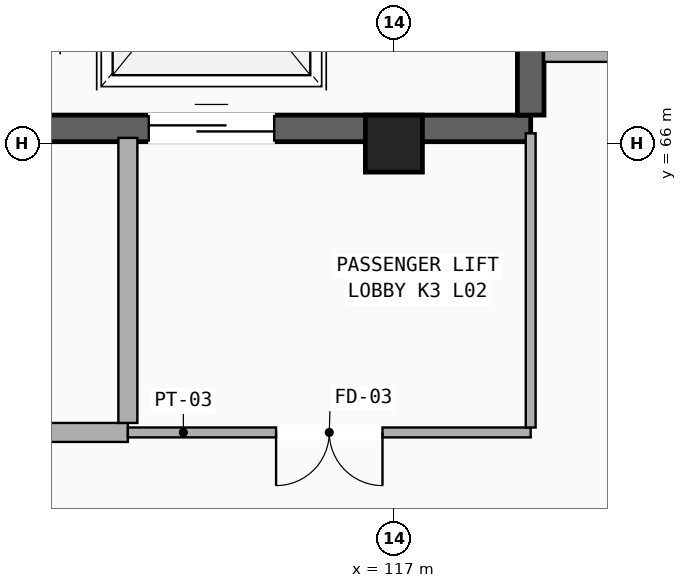
"""IFC4 building model, lengths in metres.
Left out: names, types, materials, properties, quantities, classifications, styles, units other than length and angle.
Written with IfcOpenShell. Run it as: python <this file> out.ifc"""

import sys

from ifc_helpers import new_model, si_unit, direction, frame, frame_2d, origin, origin_2d, place, context, subcontext, project, spatial, rectangle, extrude, element, fill, save


model = new_model("IFC4")
c1 = context("Model", 3, precision=1e-05, world=origin(), true_north=direction((0.0, 1.0)))
c2 = subcontext(c1, "Body", "Model", "MODEL_VIEW")
j1 = project(units=[si_unit("LENGTHUNIT", "METRE"), si_unit("PLANEANGLEUNIT", "RADIAN")], contexts=[c1])
p1 = place(None, origin())
s1 = spatial("IfcSite", under=j1, at=p1, CompositionType="ELEMENT")
p2 = place(p1, origin())
s2 = spatial("IfcBuilding", under=s1, at=p2, CompositionType="ELEMENT")
p3 = place(p2, frame((0.0, 0.0, 9.52)))
s3 = spatial("IfcBuildingStorey", under=s2, at=p3, CompositionType="ELEMENT", Elevation=9.52)
p4 = place(p3, frame((117.0, 66.0, 0.0), z_axis=(0.0, 0.0, 1.0), x_axis=(1.0, 0.0, 0.0)))
e1 = element("IfcColumn", 1, at=p4, inside=s3, PredefinedType="COLUMN", context=c2, shape_type="SweptSolid", body=[
    extrude(rectangle(XDim=0.75, YDim=0.75, at=origin_2d()), origin(), (0.0, 0.0, 1.0), 4.08),
])
p5 = place(p3, frame((108.5, 66.2, 0.0), z_axis=(0.0, 0.0, 1.0), x_axis=(1.0, 0.0, 0.0)))
e2 = element("IfcWall", 2, at=p5, inside=s3, PredefinedType="SHEAR", context=c2, shape_type="SweptSolid", body=[
    extrude(rectangle(XDim=10.3, YDim=0.35, at=frame_2d((5.15, 0.0))), origin(), (0.0, 0.0, 1.0), 4.08),
])
p6 = place(p5, frame((0.45, 0.0, 0.0)))
e3 = element("IfcOpeningElement", 3, at=p6, cuts=e2, PredefinedType="OPENING", context=c2, shape_type="SweptSolid", body=[
    extrude(rectangle(XDim=1.1, YDim=2.2, at=frame_2d((0.55, 1.1))), frame((0.0, 0.185, 0.0), z_axis=(0.0, -1.0, 0.0), x_axis=(1.0, 0.0, 0.0)), (0.0, 0.0, 1.0), 0.37),
])
p7 = place(p5, frame((2.09, 0.0, 0.0)))
e4 = element("IfcOpeningElement", 4, at=p7, cuts=e2, PredefinedType="OPENING", context=c2, shape_type="SweptSolid", body=[
    extrude(rectangle(XDim=1.22, YDim=2.2, at=frame_2d((0.61, 1.1))), frame((0.0, 0.185, 0.0), z_axis=(0.0, -1.0, 0.0), x_axis=(1.0, 0.0, 0.0)), (0.0, 0.0, 1.0), 0.37),
])
p8 = place(p5, frame((5.275, 0.0, 0.0)))
e5 = element("IfcOpeningElement", 5, at=p8, cuts=e2, PredefinedType="OPENING", context=c2, shape_type="SweptSolid", body=[
    extrude(rectangle(XDim=1.65, YDim=2.34, at=frame_2d((0.825, 1.17))), frame((0.0, 0.185, 0.0), z_axis=(0.0, -1.0, 0.0), x_axis=(1.0, 0.0, 0.0)), (0.0, 0.0, 1.0), 0.37),
])
p9 = place(p3, frame((118.8, 66.375, 0.0), z_axis=(0.0, 0.0, 1.0), x_axis=(0.0, 1.0, 0.0)))
e6 = element("IfcWall", 6, at=p9, inside=s3, PredefinedType="SHEAR", context=c2, shape_type="SweptSolid", body=[
    extrude(rectangle(XDim=8.25, YDim=0.35, at=frame_2d((4.125, 0.0))), origin(), (0.0, 0.0, 1.0), 4.08),
])
p10 = place(p3, frame((108.5, 62.2, 0.0), z_axis=(0.0, 0.0, 1.0), x_axis=(1.0, 0.0, 0.0)))
e7 = element("IfcWall", 7, at=p10, inside=s3, PredefinedType="PARTITIONING", context=c2, shape_type="SweptSolid", body=[
    extrude(rectangle(XDim=5.0, YDim=0.25, at=frame_2d((2.5, 0.0))), origin(), (0.0, 0.0, 1.0), 3.84),
])
p11 = place(p10, frame((1.95, 0.0, 0.0)))
e8 = element("IfcOpeningElement", 8, at=p11, cuts=e7, PredefinedType="OPENING", context=c2, shape_type="SweptSolid", body=[
    extrude(rectangle(XDim=1.1, YDim=2.2, at=frame_2d((0.55, 1.1))), frame((0.0, 0.135, 0.0), z_axis=(0.0, -1.0, 0.0), x_axis=(1.0, 0.0, 0.0)), (0.0, 0.0, 1.0), 0.27),
])
p12 = place(p3, frame((113.5, 62.325, 0.0), z_axis=(0.0, 0.0, 1.0), x_axis=(0.0, 1.0, 0.0)))
e9 = element("IfcWall", 9, at=p12, inside=s3, PredefinedType="PARTITIONING", context=c2, shape_type="SweptSolid", body=[
    extrude(rectangle(XDim=3.75, YDim=0.25, at=frame_2d((1.875, 0.0))), origin(), (0.0, 0.0, 1.0), 3.07),
])
p13 = place(p3, frame((113.5, 62.2, 0.0), z_axis=(0.0, 0.0, 1.0), x_axis=(1.0, 0.0, 0.0)))
e10 = element("IfcWall", 10, at=p13, inside=s3, PredefinedType="PARTITIONING", context=c2, shape_type="SweptSolid", body=[
    extrude(rectangle(XDim=5.3, YDim=0.13, at=frame_2d((2.65, 0.0))), origin(), (0.0, 0.0, 1.0), 3.84),
])
p14 = place(p13, frame((1.95, 0.0, 0.0)))
e11 = element("IfcOpeningElement", 11, at=p14, cuts=e10, PredefinedType="OPENING", context=c2, shape_type="SweptSolid", body=[
    extrude(rectangle(XDim=1.4, YDim=2.2, at=frame_2d((0.7, 1.1))), frame((0.0, 0.075, 0.0), z_axis=(0.0, -1.0, 0.0), x_axis=(1.0, 0.0, 0.0)), (0.0, 0.0, 1.0), 0.15),
])
p15 = place(p3, frame((118.8, 62.265, 0.0), z_axis=(0.0, 0.0, 1.0), x_axis=(0.0, 1.0, 0.0)))
e12 = element("IfcWall", 12, at=p15, inside=s3, PredefinedType="PARTITIONING", context=c2, shape_type="SweptSolid", body=[
    extrude(rectangle(XDim=3.87, YDim=0.13, at=frame_2d((1.935, 0.0))), origin(), (0.0, 0.0, 1.0), 3.07),
])
p16 = place(p3, frame((118.975, 67.2, 0.0), z_axis=(0.0, 0.0, 1.0), x_axis=(1.0, 0.0, 0.0)))
e13 = element("IfcWall", 13, at=p16, inside=s3, PredefinedType="PARTITIONING", context=c2, shape_type="SweptSolid", body=[
    extrude(rectangle(XDim=15.225, YDim=0.25, at=frame_2d((7.612, 0.0))), origin(), (0.0, 0.0, 1.0), 3.17),
])
p17 = place(p8, origin())
e14 = element("IfcDoor", 14, at=p17, inside=s3, OperationType="SLIDING_TO_LEFT", PredefinedType="DOOR", context=c2, shape_type="SweptSolid", body=[
    extrude(rectangle(XDim=1.65, YDim=2.34, at=frame_2d((0.825, 1.17))), frame((0.0, 0.025, 0.0), z_axis=(0.0, -1.0, 0.0), x_axis=(1.0, 0.0, 0.0)), (0.0, 0.0, 1.0), 0.05),
])
fill(e5, e14)
p18 = place(p14, frame((1.4, 0.0, 0.0), z_axis=(0.0, 0.0, 1.0), x_axis=(-1.0, 0.0, 0.0)))
e15 = element("IfcDoor", 15, at=p18, inside=s3, OperationType="DOUBLE_DOOR_SINGLE_SWING", PredefinedType="DOOR", context=c2, shape_type="SweptSolid", body=[
    extrude(rectangle(XDim=1.4, YDim=2.2, at=frame_2d((0.7, 1.1))), frame((0.0, 0.025, 0.0), z_axis=(0.0, -1.0, 0.0), x_axis=(1.0, 0.0, 0.0)), (0.0, 0.0, 1.0), 0.05),
])
fill(e11, e15)
save(model, sys.argv[1])
